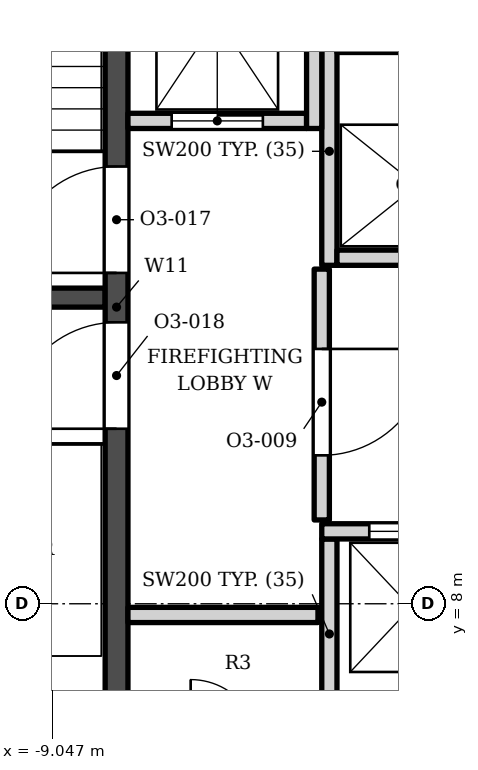
"""IFC4 building model, lengths in metres.
Left out: names, types, materials, properties, quantities, classifications, styles, units other than length and angle.
Written with IfcOpenShell. Run it as: python <this file> out.ifc"""

import sys

from ifc_helpers import new_model, si_unit, direction, frame, frame_2d, origin, place, context, subcontext, project, spatial, rectangle, extrude, element, fill, save


model = new_model("IFC4")
c1 = context("Model", 3, precision=1e-05, world=origin(), true_north=direction((0.0, 1.0)))
c2 = subcontext(c1, "Body", "Model", "MODEL_VIEW")
j1 = project(units=[si_unit("LENGTHUNIT", "METRE"), si_unit("PLANEANGLEUNIT", "RADIAN")], contexts=[c1])
p1 = place(None, origin())
s1 = spatial("IfcSite", under=j1, at=p1, CompositionType="ELEMENT")
p2 = place(p1, origin())
s2 = spatial("IfcBuilding", under=s1, at=p2, CompositionType="ELEMENT")
p3 = place(p2, frame((0.0, 0.0, 168.0)))
s3 = spatial("IfcBuildingStorey", under=s2, at=p3, CompositionType="ELEMENT", Elevation=168.0)
p4 = place(p3, frame((-8.2, 5.253, 0.0), z_axis=(0.0, 0.0, 1.0), x_axis=(0.0, 1.0, 0.0)))
e1 = element("IfcWall", 1, at=p4, inside=s3, PredefinedType="SHEAR", context=c2, shape_type="SweptSolid", body=[
    extrude(rectangle(XDim=13.3, YDim=0.3, at=frame_2d((6.65, 0.0))), origin(), (0.0, 0.0, 1.0), 3.9),
])
p5 = place(p4, frame((7.1, 0.0, 0.0)))
e2 = element("IfcOpeningElement", 2, at=p5, cuts=e1, PredefinedType="OPENING", context=c2, shape_type="SweptSolid", body=[
    extrude(rectangle(XDim=1.4, YDim=2.1, at=frame_2d((0.7, 1.05))), frame((0.0, 0.16, 0.0), z_axis=(0.0, -1.0, 0.0), x_axis=(1.0, 0.0, 0.0)), (0.0, 0.0, 1.0), 0.32),
])
p6 = place(p4, frame((5.05, 0.0, 0.0)))
e3 = element("IfcOpeningElement", 3, at=p6, cuts=e1, PredefinedType="OPENING", context=c2, shape_type="SweptSolid", body=[
    extrude(rectangle(XDim=1.4, YDim=2.1, at=frame_2d((0.7, 1.05))), frame((0.0, 0.16, 0.0), z_axis=(0.0, -1.0, 0.0), x_axis=(1.0, 0.0, 0.0)), (0.0, 0.0, 1.0), 0.32),
])
p7 = place(p3, frame((-12.1, 12.028, 0.0), z_axis=(0.0, 0.0, 1.0), x_axis=(1.0, 0.0, 0.0)))
e4 = element("IfcWall", 4, at=p7, inside=s3, PredefinedType="SHEAR", context=c2, shape_type="SweptSolid", body=[
    extrude(rectangle(XDim=3.75, YDim=0.25, at=frame_2d((1.875, 0.0))), origin(), (0.0, 0.0, 1.0), 3.9),
])
for number, where, z_axis, x_axis in (
    (5, (-5.4, 6.353, 0.0), (0.0, 0.0, 1.0), (0.0, 1.0, 0.0)),
    (6, (-8.05, 7.853, 0.0), (0.0, 0.0, 1.0), (1.0, 0.0, 0.0)),
):
    element("IfcWall", number, at=place(p3, frame(where, z_axis=z_axis, x_axis=x_axis)), inside=s3, PredefinedType="SOLIDWALL", context=c2, shape_type="SweptSolid", body=[
        extrude(rectangle(XDim=2.5, YDim=0.2, at=frame_2d((1.25, 0.0))), origin(), (0.0, 0.0, 1.0), 3.73),
    ])
p8 = place(p3, frame((-5.5, 8.953, 0.0), z_axis=(0.0, 0.0, 1.0), x_axis=(1.0, 0.0, 0.0)))
e7 = element("IfcWall", 7, at=p8, inside=s3, PredefinedType="SOLIDWALL", context=c2, shape_type="SweptSolid", body=[
    extrude(rectangle(XDim=4.5, YDim=0.2, at=frame_2d((2.25, 0.0))), origin(), (0.0, 0.0, 1.0), 3.73),
])
p9 = place(p8, frame((0.625, 0.0, 0.0)))
e8 = element("IfcOpeningElement", 8, at=p9, cuts=e7, PredefinedType="OPENING", context=c2, shape_type="SweptSolid", body=[
    extrude(rectangle(XDim=1.1, YDim=2.1, at=frame_2d((0.55, 1.05))), frame((0.0, 0.11, 0.0), z_axis=(0.0, -1.0, 0.0), x_axis=(1.0, 0.0, 0.0)), (0.0, 0.0, 1.0), 0.22),
])
p10 = place(p8, frame((2.775, 0.0, 0.0)))
e9 = element("IfcOpeningElement", 9, at=p10, cuts=e7, PredefinedType="OPENING", context=c2, shape_type="SweptSolid", body=[
    extrude(rectangle(XDim=1.1, YDim=2.1, at=frame_2d((0.55, 1.05))), frame((0.0, 0.11, 0.0), z_axis=(0.0, -1.0, 0.0), x_axis=(1.0, 0.0, 0.0)), (0.0, 0.0, 1.0), 0.22),
])
p11 = place(p3, frame((-5.5, 9.103, 0.0), z_axis=(0.0, 0.0, 1.0), x_axis=(0.0, 1.0, 0.0)))
e10 = element("IfcWall", 10, at=p11, inside=s3, PredefinedType="SOLIDWALL", context=c2, shape_type="SweptSolid", body=[
    extrude(rectangle(XDim=3.3, YDim=0.2, at=frame_2d((1.65, 0.0))), origin(), (0.0, 0.0, 1.0), 3.73),
])
p12 = place(p11, frame((0.85, 0.0, 0.0)))
e11 = element("IfcOpeningElement", 11, at=p12, cuts=e10, PredefinedType="OPENING", context=c2, shape_type="SweptSolid", body=[
    extrude(rectangle(XDim=1.4, YDim=2.1, at=frame_2d((0.7, 1.05))), frame((0.0, 0.11, 0.0), z_axis=(0.0, -1.0, 0.0), x_axis=(1.0, 0.0, 0.0)), (0.0, 0.0, 1.0), 0.22),
])
p13 = place(p3, frame((-5.4, 12.453, 0.0), z_axis=(0.0, 0.0, 1.0), x_axis=(0.0, 1.0, 0.0)))
e12 = element("IfcWall", 12, at=p13, inside=s3, PredefinedType="SOLIDWALL", context=c2, shape_type="SweptSolid", body=[
    extrude(rectangle(XDim=3.0, YDim=0.2, at=frame_2d((1.5, 0.0))), origin(), (0.0, 0.0, 1.0), 3.73),
])
p14 = place(p3, frame((-5.3, 12.552, 0.0), z_axis=(0.0, 0.0, 1.0), x_axis=(1.0, 0.0, 0.0)))
e13 = element("IfcWall", 13, at=p14, inside=s3, PredefinedType="SOLIDWALL", context=c2, shape_type="SweptSolid", body=[
    extrude(rectangle(XDim=2.1, YDim=0.2, at=frame_2d((1.05, 0.0))), origin(), (0.0, 0.0, 1.0), 3.73),
])
p15 = place(p3, frame((-8.05, 14.353, 0.0), z_axis=(0.0, 0.0, 1.0), x_axis=(1.0, 0.0, 0.0)))
e14 = element("IfcWall", 14, at=p15, inside=s3, PredefinedType="SOLIDWALL", context=c2, shape_type="SweptSolid", body=[
    extrude(rectangle(XDim=2.35, YDim=0.2, at=frame_2d((1.175, 0.0))), origin(), (0.0, 0.0, 1.0), 3.73),
])
p16 = place(p15, frame((0.575, 0.0, 0.0)))
e15 = element("IfcOpeningElement", 15, at=p16, cuts=e14, PredefinedType="OPENING", context=c2, shape_type="SweptSolid", body=[
    extrude(rectangle(XDim=1.2, YDim=2.1, at=frame_2d((0.6, 1.05))), frame((0.0, 0.11, 0.0), z_axis=(0.0, -1.0, 0.0), x_axis=(1.0, 0.0, 0.0)), (0.0, 0.0, 1.0), 0.22),
])
p17 = place(p3, frame((-5.6, 14.253, 0.0), z_axis=(0.0, 0.0, 1.0), x_axis=(0.0, 1.0, 0.0)))
e16 = element("IfcWall", 16, at=p17, inside=s3, PredefinedType="SOLIDWALL", context=c2, shape_type="SweptSolid", body=[
    extrude(rectangle(XDim=4.3, YDim=0.2, at=frame_2d((2.15, 0.0))), origin(), (0.0, 0.0, 1.0), 3.73),
])
p18 = place(p3, frame((-5.3, 15.353, 0.0), z_axis=(0.0, 0.0, 1.0), x_axis=(1.0, 0.0, 0.0)))
e17 = element("IfcWall", 17, at=p18, inside=s3, PredefinedType="SOLIDWALL", context=c2, shape_type="SweptSolid", body=[
    extrude(rectangle(XDim=2.1, YDim=0.2, at=frame_2d((1.05, 0.0))), origin(), (0.0, 0.0, 1.0), 3.73),
])
p19 = place(p9, origin())
e18 = element("IfcDoor", 18, at=p19, inside=s3, OperationType="DOUBLE_DOOR_SLIDING", PredefinedType="DOOR", context=c2, shape_type="SweptSolid", body=[
    extrude(rectangle(XDim=1.1, YDim=2.1, at=frame_2d((0.55, 1.05))), frame((0.0, 0.025, 0.0), z_axis=(0.0, -1.0, 0.0), x_axis=(1.0, 0.0, 0.0)), (0.0, 0.0, 1.0), 0.05),
])
fill(e8, e18)
p20 = place(p16, origin())
e19 = element("IfcDoor", 19, at=p20, inside=s3, OperationType="DOUBLE_DOOR_SLIDING", PredefinedType="DOOR", context=c2, shape_type="SweptSolid", body=[
    extrude(rectangle(XDim=1.2, YDim=2.1, at=frame_2d((0.6, 1.05))), frame((0.0, 0.025, 0.0), z_axis=(0.0, -1.0, 0.0), x_axis=(1.0, 0.0, 0.0)), (0.0, 0.0, 1.0), 0.05),
])
fill(e15, e19)
p21 = place(p5, origin())
e20 = element("IfcDoor", 20, at=p21, inside=s3, OperationType="SINGLE_SWING_LEFT", PredefinedType="DOOR", context=c2, shape_type="SweptSolid", body=[
    extrude(rectangle(XDim=1.4, YDim=2.1, at=frame_2d((0.7, 1.05))), frame((0.0, 0.025, 0.0), z_axis=(0.0, -1.0, 0.0), x_axis=(1.0, 0.0, 0.0)), (0.0, 0.0, 1.0), 0.05),
])
fill(e2, e20)
p22 = place(p6, origin())
e21 = element("IfcDoor", 21, at=p22, inside=s3, OperationType="SINGLE_SWING_LEFT", PredefinedType="DOOR", context=c2, shape_type="SweptSolid", body=[
    extrude(rectangle(XDim=1.4, YDim=2.1, at=frame_2d((0.7, 1.05))), frame((0.0, 0.025, 0.0), z_axis=(0.0, -1.0, 0.0), x_axis=(1.0, 0.0, 0.0)), (0.0, 0.0, 1.0), 0.05),
])
fill(e3, e21)
p23 = place(p12, origin())
e22 = element("IfcDoor", 22, at=p23, inside=s3, OperationType="SINGLE_SWING_RIGHT", PredefinedType="DOOR", context=c2, shape_type="SweptSolid", body=[
    extrude(rectangle(XDim=1.4, YDim=2.1, at=frame_2d((0.7, 1.05))), frame((0.0, 0.025, 0.0), z_axis=(0.0, -1.0, 0.0), x_axis=(1.0, 0.0, 0.0)), (0.0, 0.0, 1.0), 0.05),
])
fill(e11, e22)
save(model, sys.argv[1])
